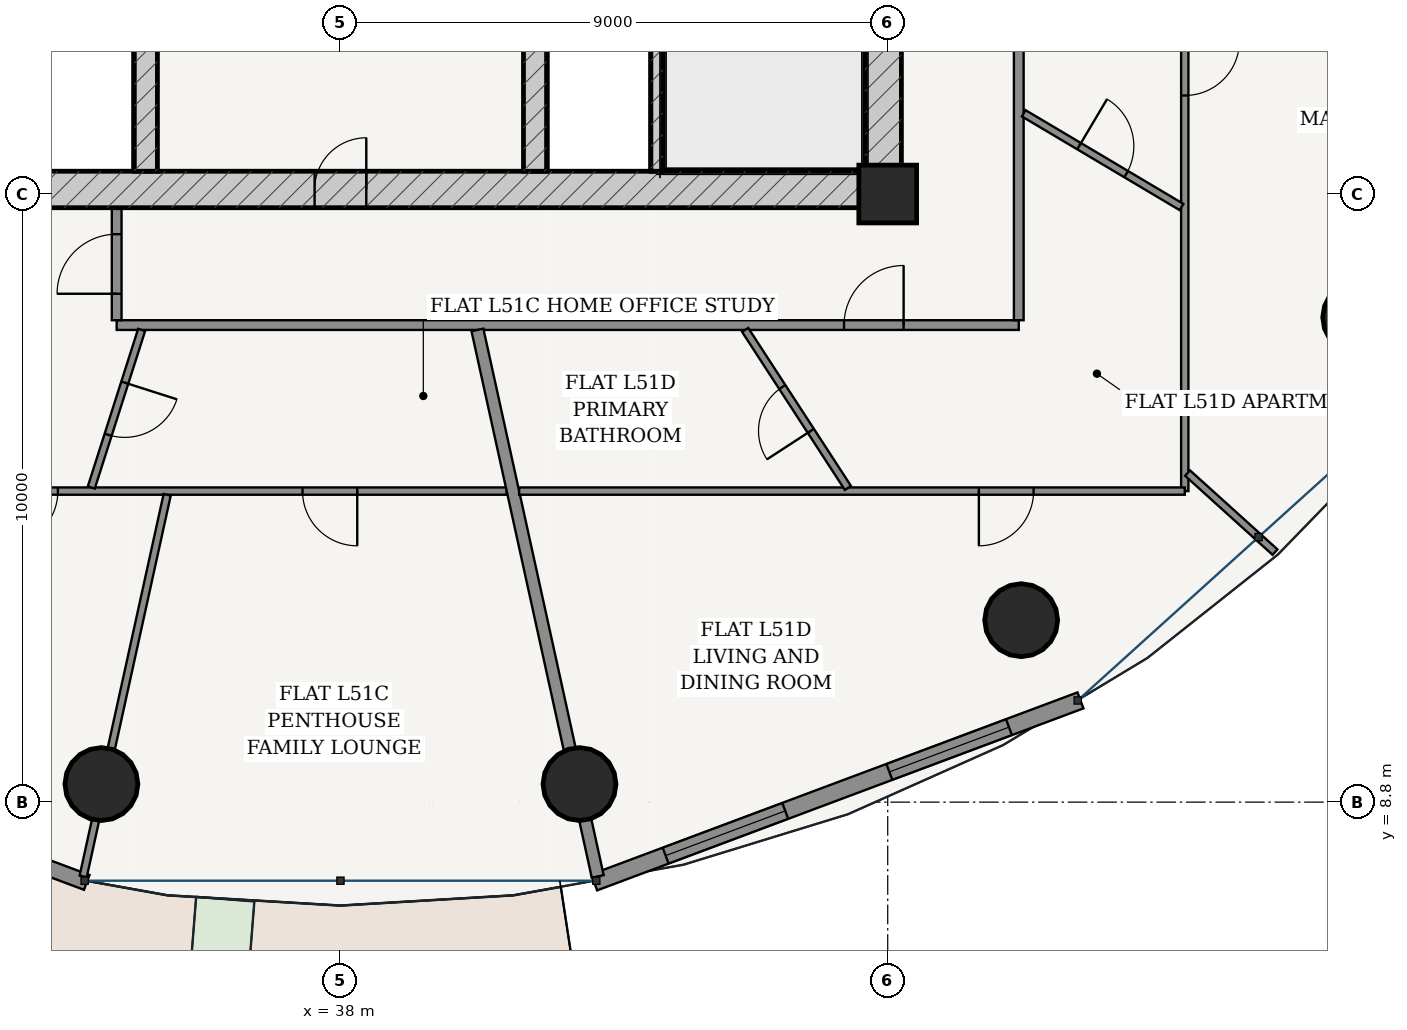
"""IFC4 building model, lengths in metres.
Left out: names, types, materials, properties, quantities, classifications, styles, units other than length and angle.
Written with IfcOpenShell. Run it as: python <this file> out.ifc"""

import sys

from ifc_helpers import new_model, si_unit, direction, frame, frame_2d, origin, origin_2d, place, context, subcontext, project, spatial, rectangle, hollow_circle, extrude, source, transform, mapped, element, fill, save


model = new_model("IFC4")
c1 = context("Model", 3, precision=1e-05, world=origin(), true_north=direction((-0.2419218956, 0.970295726276)))
c2 = subcontext(c1, "Body", "Model", "MODEL_VIEW")
j1 = project(units=[si_unit("LENGTHUNIT", "METRE"), si_unit("PLANEANGLEUNIT", "RADIAN")], contexts=[c1])
p1 = place(None, origin())
s1 = spatial("IfcSite", under=j1, at=p1, CompositionType="ELEMENT")
p2 = place(p1, origin())
s2 = spatial("IfcBuilding", under=s1, at=p2, CompositionType="ELEMENT")
p3 = place(p2, frame((0.0, 0.0, 194.9)))
s3 = spatial("IfcBuildingStorey", under=s2, at=p3, CompositionType="ELEMENT", Elevation=194.9)
p4 = place(p3, frame((47.0, 18.8, 0.0), z_axis=(0.0, 0.0, 1.0), x_axis=(1.0, 0.0, 0.0)))
e1 = element("IfcColumn", 1, at=p4, inside=s3, PredefinedType="COLUMN", context=c2, shape_type="SweptSolid", body=[
    extrude(rectangle(XDim=0.95, YDim=0.95, at=origin_2d()), origin(), (0.0, 0.0, 1.0), 3.7),
])
p5 = place(p3, frame((28.775, 18.875, 0.0), z_axis=(0.0, 0.0, 1.0), x_axis=(1.0, 0.0, 0.0)))
e2 = element("IfcWall", 2, at=p5, inside=s3, PredefinedType="SHEAR", context=c2, shape_type="SweptSolid", body=[
    extrude(rectangle(XDim=18.45, YDim=0.6, at=frame_2d((9.225, 0.0))), origin(), (0.0, 0.0, 1.0), 3.435),
])
p6 = place(p5, frame((8.8, 0.0, 0.0)))
e3 = element("IfcOpeningElement", 3, at=p6, cuts=e2, PredefinedType="OPENING", context=c2, shape_type="SweptSolid", body=[
    extrude(rectangle(XDim=0.85, YDim=2.1, at=frame_2d((0.425, 1.05))), frame((0.0, 0.31, 0.0), z_axis=(0.0, -1.0, 0.0), x_axis=(1.0, 0.0, 0.0)), (0.0, 0.0, 1.0), 0.62),
])
p7 = place(p3, frame((46.925, 19.175, 0.0), z_axis=(0.0, 0.0, 1.0), x_axis=(0.0, 1.0, 0.0)))
e4 = element("IfcWall", 4, at=p7, inside=s3, PredefinedType="SHEAR", context=c2, shape_type="SweptSolid", body=[
    extrude(rectangle(XDim=15.25, YDim=0.6, at=frame_2d((7.625, 0.0))), origin(), (0.0, 0.0, 1.0), 3.435),
])
p8 = place(p7, frame((9.875, 0.0, 0.0)))
e5 = element("IfcOpeningElement", 5, at=p8, cuts=e4, PredefinedType="OPENING", context=c2, shape_type="SweptSolid", body=[
    extrude(rectangle(XDim=1.5, YDim=2.2, at=frame_2d((0.75, 1.1))), frame((0.0, 0.31, 0.0), z_axis=(0.0, -1.0, 0.0), x_axis=(1.0, 0.0, 0.0)), (0.0, 0.0, 1.0), 0.62),
])
p9 = place(p3, frame((43.205, 19.175, 0.0), z_axis=(0.0, 0.0, 1.0), x_axis=(0.0, 1.0, 0.0)))
e6 = element("IfcWall", 6, at=p9, inside=s3, PredefinedType="SOLIDWALL", context=c2, shape_type="SweptSolid", body=[
    extrude(rectangle(XDim=7.375, YDim=0.2, at=frame_2d((3.688, 0.0))), origin(), (0.0, 0.0, 1.0), 3.435),
])
p10 = place(p3, frame((34.8, 19.175, 0.0), z_axis=(0.0, 0.0, 1.0), x_axis=(0.0, 1.0, 0.0)))
e7 = element("IfcWall", 7, at=p10, inside=s3, PredefinedType="SHEAR", context=c2, shape_type="SweptSolid", body=[
    extrude(rectangle(XDim=15.25, YDim=0.38, at=frame_2d((7.625, 0.0))), origin(), (0.0, 0.0, 1.0), 3.435),
])
p11 = place(p10, frame((7.8, 0.0, 0.0)))
e8 = element("IfcOpeningElement", 8, at=p11, cuts=e7, PredefinedType="OPENING", context=c2, shape_type="SweptSolid", body=[
    extrude(rectangle(XDim=1.05, YDim=2.15, at=frame_2d((0.525, 1.075))), frame((0.0, 0.2, 0.0), z_axis=(0.0, -1.0, 0.0), x_axis=(1.0, 0.0, 0.0)), (0.0, 0.0, 1.0), 0.4),
])
p12 = place(p3, frame((41.2, 19.175, 0.0), z_axis=(0.0, 0.0, 1.0), x_axis=(0.0, 1.0, 0.0)))
e9 = element("IfcWall", 9, at=p12, inside=s3, PredefinedType="SHEAR", context=c2, shape_type="SweptSolid", body=[
    extrude(rectangle(XDim=15.25, YDim=0.38, at=frame_2d((7.625, 0.0))), origin(), (0.0, 0.0, 1.0), 3.435),
])
p13 = place(p12, frame((7.8, 0.0, 0.0)))
e10 = element("IfcOpeningElement", 10, at=p13, cuts=e9, PredefinedType="OPENING", context=c2, shape_type="SweptSolid", body=[
    extrude(rectangle(XDim=1.05, YDim=2.15, at=frame_2d((0.525, 1.075))), frame((0.0, 0.2, 0.0), z_axis=(0.0, -1.0, 0.0), x_axis=(1.0, 0.0, 0.0)), (0.0, 0.0, 1.0), 0.4),
])
for number, where, z_axis, x_axis in (
    (11, (34.069, 9.097, 0.0), (0.0, 0.0, 1.0), (1.0, 0.0, 0.0)),
    (12, (41.931, 9.097, 0.0), (0.0, 0.0, 1.0), (1.0, 0.0, 0.0)),
    (13, (49.195, 11.792, 0.0), (0.0, 0.0, 1.0), (1.0, 0.0, 0.0)),
    (14, (54.754, 16.772, 0.0), (0.0, 0.0, 1.0), (1.0, 0.0, 0.0)),
):
    element("IfcColumn", number, at=place(p3, frame(where, z_axis=z_axis, x_axis=x_axis)), inside=s3, PredefinedType="COLUMN", context=c2, shape_type="SweptSolid", body=[
        extrude(hollow_circle(Radius=0.6, WallThickness=0.038, at=origin_2d()), origin(), (0.0, 0.0, 1.0), 3.7),
    ])
p14 = place(p3, frame((25.83, 10.473, 0.0), z_axis=(0.0, 0.0, 1.0), x_axis=(0.936556918375, -0.350515532672, 0.0)))
e15 = element("IfcWall", 15, at=p14, inside=s3, PredefinedType="SOLIDWALL", context=c2, shape_type="SweptSolid", body=[
    extrude(rectangle(XDim=8.539, YDim=0.26, at=frame_2d((4.27, 0.0))), origin(), (0.0, 0.0, 1.0), 3.435),
])
p15 = place(p14, frame((3.594, 0.0, 0.0)))
e16 = element("IfcOpeningElement", 16, at=p15, cuts=e15, PredefinedType="OPENING", context=c2, shape_type="SweptSolid", body=[
    extrude(rectangle(XDim=1.35, YDim=2.2, at=frame_2d((0.675, 1.1))), frame((0.0, 0.14, 0.0), z_axis=(0.0, -1.0, 0.0), x_axis=(1.0, 0.0, 0.0)), (0.0, 0.0, 1.0), 0.28),
])
p16 = place(p3, frame((42.172, 7.48, 0.0), z_axis=(0.0, 0.0, 1.0), x_axis=(0.936556918375, 0.350515532672, 0.0)))
e17 = element("IfcWall", 17, at=p16, inside=s3, PredefinedType="SOLIDWALL", context=c2, shape_type="SweptSolid", body=[
    extrude(rectangle(XDim=8.539, YDim=0.28, at=frame_2d((4.27, 0.0))), origin(), (0.0, 0.0, 1.0), 3.435),
])
p17 = place(p16, frame((1.256, 0.0, 0.85)))
e18 = element("IfcOpeningElement", 18, at=p17, cuts=e17, PredefinedType="OPENING", context=c2, shape_type="SweptSolid", body=[
    extrude(rectangle(XDim=2.1, YDim=1.95, at=frame_2d((1.05, 0.975))), frame((0.0, 0.15, 0.0), z_axis=(0.0, -1.0, 0.0), x_axis=(1.0, 0.0, 0.0)), (0.0, 0.0, 1.0), 0.3),
])
p18 = place(p16, frame((5.184, 0.0, 0.85)))
e19 = element("IfcOpeningElement", 19, at=p18, cuts=e17, PredefinedType="OPENING", context=c2, shape_type="SweptSolid", body=[
    extrude(rectangle(XDim=2.1, YDim=1.95, at=frame_2d((1.05, 0.975))), frame((0.0, 0.15, 0.0), z_axis=(0.0, -1.0, 0.0), x_axis=(1.0, 0.0, 0.0)), (0.0, 0.0, 1.0), 0.3),
])
p19 = place(p3, frame((34.32, 16.645, 0.0), z_axis=(0.0, 0.0, 1.0), x_axis=(1.0, 0.0, 0.0)))
e20 = element("IfcWall", 20, at=p19, inside=s3, PredefinedType="PARTITIONING", context=c2, shape_type="SweptSolid", body=[
    extrude(rectangle(XDim=14.835, YDim=0.16, at=frame_2d((7.417, 0.0))), origin(), (0.0, 0.0, 1.0), 2.951),
])
p20 = place(p19, frame((11.961, 0.0, 0.0)))
e21 = element("IfcOpeningElement", 21, at=p20, cuts=e20, PredefinedType="OPENING", context=c2, shape_type="SweptSolid", body=[
    extrude(rectangle(XDim=0.98, YDim=2.2, at=frame_2d((0.49, 1.1))), frame((0.0, 0.09, 0.0), z_axis=(0.0, -1.0, 0.0), x_axis=(1.0, 0.0, 0.0)), (0.0, 0.0, 1.0), 0.18),
])
p21 = place(p3, frame((34.32, 16.725, 0.0), z_axis=(0.0, 0.0, 1.0), x_axis=(0.0, 1.0, 0.0)))
e22 = element("IfcWall", 22, at=p21, inside=s3, PredefinedType="PARTITIONING", context=c2, shape_type="SweptSolid", body=[
    extrude(rectangle(XDim=1.85, YDim=0.16, at=frame_2d((0.925, 0.0))), origin(), (0.0, 0.0, 1.0), 3.435),
])
p22 = place(p21, frame((0.435, 0.0, 0.0)))
e23 = element("IfcOpeningElement", 23, at=p22, cuts=e22, PredefinedType="OPENING", context=c2, shape_type="SweptSolid", body=[
    extrude(rectangle(XDim=0.98, YDim=2.2, at=frame_2d((0.49, 1.1))), frame((0.0, 0.09, 0.0), z_axis=(0.0, -1.0, 0.0), x_axis=(1.0, 0.0, 0.0)), (0.0, 0.0, 1.0), 0.18),
])
p23 = place(p3, frame((49.155, 16.725, 0.0), z_axis=(0.0, 0.0, 1.0), x_axis=(0.0, 1.0, 0.0)))
e24 = element("IfcWall", 24, at=p23, inside=s3, PredefinedType="PARTITIONING", context=c2, shape_type="SweptSolid", body=[
    extrude(rectangle(XDim=18.3, YDim=0.16, at=frame_2d((9.15, 0.0))), origin(), (0.0, 0.0, 1.0), 2.951),
])
p24 = place(p3, frame((40.734, 13.915, 0.0), z_axis=(0.0, 0.0, 1.0), x_axis=(-1.0, 0.0, 0.0)))
e25 = element("IfcWall", 25, at=p24, inside=s3, PredefinedType="PARTITIONING", context=c2, shape_type="SweptSolid", body=[
    extrude(rectangle(XDim=9.144, YDim=0.12, at=frame_2d((4.572, 0.0))), origin(), (0.0, 0.0, 1.0), 2.951),
])
p25 = place(p24, frame((7.381, 0.0, 0.0)))
e26 = element("IfcOpeningElement", 26, at=p25, cuts=e25, PredefinedType="OPENING", context=c2, shape_type="SweptSolid", body=[
    extrude(rectangle(XDim=0.9, YDim=2.15, at=frame_2d((0.45, 1.075))), frame((0.0, 0.07, 0.0), z_axis=(0.0, -1.0, 0.0), x_axis=(1.0, 0.0, 0.0)), (0.0, 0.0, 1.0), 0.14),
])
p26 = place(p24, frame((2.458, 0.0, 0.0)))
e27 = element("IfcOpeningElement", 27, at=p26, cuts=e25, PredefinedType="OPENING", context=c2, shape_type="SweptSolid", body=[
    extrude(rectangle(XDim=0.9, YDim=2.15, at=frame_2d((0.45, 1.075))), frame((0.0, 0.07, 0.0), z_axis=(0.0, -1.0, 0.0), x_axis=(1.0, 0.0, 0.0)), (0.0, 0.0, 1.0), 0.14),
])
p27 = place(p3, frame((35.15, 13.854, 0.0), z_axis=(0.0, 0.0, 1.0), x_axis=(-0.214942949264, -0.976626606519, 0.0)))
e28 = element("IfcWall", 28, at=p27, inside=s3, PredefinedType="PARTITIONING", context=c2, shape_type="SweptSolid", body=[
    extrude(rectangle(XDim=6.427, YDim=0.12, at=frame_2d((3.213, 0.0))), origin(), (0.0, 0.0, 1.0), 2.951),
])
p28 = place(p3, frame((34.73, 16.565, 0.0), z_axis=(0.0, 0.0, 1.0), x_axis=(-0.304300161081, -0.952576197459, 0.0)))
e29 = element("IfcWall", 29, at=p28, inside=s3, PredefinedType="PARTITIONING", context=c2, shape_type="SweptSolid", body=[
    extrude(rectangle(XDim=2.72, YDim=0.12, at=frame_2d((1.36, 0.0))), origin(), (0.0, 0.0, 1.0), 3.11),
])
p29 = place(p28, frame((0.91, 0.0, 0.0)))
e30 = element("IfcOpeningElement", 30, at=p29, cuts=e29, PredefinedType="OPENING", context=c2, shape_type="SweptSolid", body=[
    extrude(rectangle(XDim=0.9, YDim=2.15, at=frame_2d((0.45, 1.075))), frame((0.0, 0.07, 0.0), z_axis=(0.0, -1.0, 0.0), x_axis=(1.0, 0.0, 0.0)), (0.0, 0.0, 1.0), 0.14),
])
p30 = place(p3, frame((40.253, 16.565, 0.0), z_axis=(0.0, 0.0, 1.0), x_axis=(0.214957946814, -0.976623305631, 0.0)))
e31 = element("IfcWall", 31, at=p30, inside=s3, PredefinedType="PARTITIONING", context=c2, shape_type="SweptSolid", body=[
    extrude(rectangle(XDim=9.202, YDim=0.2, at=frame_2d((4.601, 0.0))), origin(), (0.0, 0.0, 1.0), 2.951),
])
p31 = place(p3, frame((51.885, 29.194, 0.0), z_axis=(0.0, 0.0, 1.0), x_axis=(0.0, -1.0, 0.0)))
e32 = element("IfcWall", 32, at=p31, inside=s3, PredefinedType="PARTITIONING", context=c2, shape_type="SweptSolid", body=[
    extrude(rectangle(XDim=15.279, YDim=0.12, at=frame_2d((7.639, 0.0))), origin(), (0.0, 0.0, 1.0), 2.951),
])
p32 = place(p31, frame((7.873, 0.0, 0.0)))
e33 = element("IfcOpeningElement", 33, at=p32, cuts=e32, PredefinedType="OPENING", context=c2, shape_type="SweptSolid", body=[
    extrude(rectangle(XDim=0.9, YDim=2.15, at=frame_2d((0.45, 1.075))), frame((0.0, 0.07, 0.0), z_axis=(0.0, -1.0, 0.0), x_axis=(1.0, 0.0, 0.0)), (0.0, 0.0, 1.0), 0.14),
])
p33 = place(p3, frame((51.885, 13.915, 0.0), z_axis=(0.0, 0.0, 1.0), x_axis=(-1.0, 0.0, 0.0)))
e34 = element("IfcWall", 34, at=p33, inside=s3, PredefinedType="PARTITIONING", context=c2, shape_type="SweptSolid", body=[
    extrude(rectangle(XDim=10.947, YDim=0.12, at=frame_2d((5.473, 0.0))), origin(), (0.0, 0.0, 1.0), 2.951),
])
p34 = place(p33, frame((2.486, 0.0, 0.0)))
e35 = element("IfcOpeningElement", 35, at=p34, cuts=e34, PredefinedType="OPENING", context=c2, shape_type="SweptSolid", body=[
    extrude(rectangle(XDim=0.9, YDim=2.15, at=frame_2d((0.45, 1.075))), frame((0.0, 0.07, 0.0), z_axis=(0.0, -1.0, 0.0), x_axis=(1.0, 0.0, 0.0)), (0.0, 0.0, 1.0), 0.14),
])
p35 = place(p3, frame((51.931, 14.211, 0.0), z_axis=(0.0, 0.0, 1.0), x_axis=(0.741971265209, -0.670431683026, 0.0)))
e36 = element("IfcWall", 36, at=p35, inside=s3, PredefinedType="PARTITIONING", context=c2, shape_type="SweptSolid", body=[
    extrude(rectangle(XDim=1.938, YDim=0.12, at=frame_2d((0.969, 0.0))), origin(), (0.0, 0.0, 1.0), 2.951),
])
p36 = place(p3, frame((44.656, 16.565, 0.0), z_axis=(0.0, 0.0, 1.0), x_axis=(0.545173870382, -0.838322999239, 0.0)))
e37 = element("IfcWall", 37, at=p36, inside=s3, PredefinedType="PARTITIONING", context=c2, shape_type="SweptSolid", body=[
    extrude(rectangle(XDim=3.099, YDim=0.12, at=frame_2d((1.549, 0.0))), origin(), (0.0, 0.0, 1.0), 3.11),
])
p37 = place(p36, frame((1.119, 0.0, 0.0)))
e38 = element("IfcOpeningElement", 38, at=p37, cuts=e37, PredefinedType="OPENING", context=c2, shape_type="SweptSolid", body=[
    extrude(rectangle(XDim=0.86, YDim=2.15, at=frame_2d((0.43, 1.075))), frame((0.0, 0.07, 0.0), z_axis=(0.0, -1.0, 0.0), x_axis=(1.0, 0.0, 0.0)), (0.0, 0.0, 1.0), 0.14),
])
p38 = place(p3, frame((49.237, 20.128, 0.0), z_axis=(0.0, 0.0, 1.0), x_axis=(0.859818120481, -0.510600430565, 0.0)))
e39 = element("IfcWall", 39, at=p38, inside=s3, PredefinedType="PARTITIONING", context=c2, shape_type="SweptSolid", body=[
    extrude(rectangle(XDim=3.018, YDim=0.12, at=frame_2d((1.509, 0.0))), origin(), (0.0, 0.0, 1.0), 2.951),
])
p39 = place(p38, frame((1.059, 0.0, 0.0)))
e40 = element("IfcOpeningElement", 40, at=p39, cuts=e39, PredefinedType="OPENING", context=c2, shape_type="SweptSolid", body=[
    extrude(rectangle(XDim=0.9, YDim=2.15, at=frame_2d((0.45, 1.075))), frame((0.0, 0.07, 0.0), z_axis=(0.0, -1.0, 0.0), x_axis=(1.0, 0.0, 0.0)), (0.0, 0.0, 1.0), 0.14),
])
m1 = source(origin(), c2, "Body", "SweptSolid", [
    extrude(rectangle(XDim=2.1, YDim=1.95, at=frame_2d((1.05, 0.975))), frame((0.0, 0.03, 0.0), z_axis=(0.0, -1.0, 0.0), x_axis=(1.0, 0.0, 0.0)), (0.0, 0.0, 1.0), 0.06),
])
p40 = place(p17, origin())
e41 = element("IfcWindow", 41, at=p40, inside=s3, PartitioningType="SINGLE_PANEL", PredefinedType="WINDOW", context=c2, shape_type="MappedRepresentation", body=[
    mapped(m1, transform((0.0, 0.0, 0.0), scale=1.0)),
])
fill(e18, e41)
p41 = place(p18, origin())
e42 = element("IfcWindow", 42, at=p41, inside=s3, PartitioningType="SINGLE_PANEL", PredefinedType="WINDOW", context=c2, shape_type="MappedRepresentation", body=[
    mapped(m1, transform((0.0, 0.0, 0.0), scale=1.0)),
])
fill(e19, e42)
m2 = source(origin(), c2, "Body", "SweptSolid", [
    extrude(rectangle(XDim=0.85, YDim=2.1, at=frame_2d((0.425, 1.05))), frame((0.0, 0.025, 0.0), z_axis=(0.0, -1.0, 0.0), x_axis=(1.0, 0.0, 0.0)), (0.0, 0.0, 1.0), 0.05),
])
p42 = place(p6, origin())
e43 = element("IfcDoor", 43, at=p42, inside=s3, OperationType="SINGLE_SWING_RIGHT", PredefinedType="DOOR", context=c2, shape_type="MappedRepresentation", body=[
    mapped(m2, transform((0.0, 0.0, 0.0), scale=1.0)),
])
fill(e3, e43)
m3 = source(origin(), c2, "Body", "SweptSolid", [
    extrude(rectangle(XDim=0.98, YDim=2.2, at=frame_2d((0.49, 1.1))), frame((0.0, 0.025, 0.0), z_axis=(0.0, -1.0, 0.0), x_axis=(1.0, 0.0, 0.0)), (0.0, 0.0, 1.0), 0.05),
])
p43 = place(p22, origin())
e44 = element("IfcDoor", 44, at=p43, inside=s3, OperationType="SINGLE_SWING_LEFT", PredefinedType="DOOR", context=c2, shape_type="MappedRepresentation", body=[
    mapped(m3, transform((0.0, 0.0, 0.0), scale=1.0)),
])
fill(e23, e44)
m4 = source(origin(), c2, "Body", "SweptSolid", [
    extrude(rectangle(XDim=0.9, YDim=2.15, at=frame_2d((0.45, 1.075))), frame((0.0, 0.025, 0.0), z_axis=(0.0, -1.0, 0.0), x_axis=(1.0, 0.0, 0.0)), (0.0, 0.0, 1.0), 0.05),
])
p44 = place(p29, origin())
e45 = element("IfcDoor", 45, at=p44, inside=s3, OperationType="SINGLE_SWING_LEFT", PredefinedType="DOOR", context=c2, shape_type="MappedRepresentation", body=[
    mapped(m4, transform((0.0, 0.0, 0.0), scale=1.0)),
])
fill(e30, e45)
p45 = place(p25, origin())
e46 = element("IfcDoor", 46, at=p45, inside=s3, OperationType="SINGLE_SWING_RIGHT", PredefinedType="DOOR", context=c2, shape_type="MappedRepresentation", body=[
    mapped(m4, transform((0.0, 0.0, 0.0), scale=1.0)),
])
fill(e26, e46)
p46 = place(p26, origin())
e47 = element("IfcDoor", 47, at=p46, inside=s3, OperationType="SINGLE_SWING_LEFT", PredefinedType="DOOR", context=c2, shape_type="MappedRepresentation", body=[
    mapped(m4, transform((0.0, 0.0, 0.0), scale=1.0)),
])
fill(e27, e47)
p47 = place(p20, origin())
e48 = element("IfcDoor", 48, at=p47, inside=s3, OperationType="SINGLE_SWING_RIGHT", PredefinedType="DOOR", context=c2, shape_type="MappedRepresentation", body=[
    mapped(m3, transform((0.0, 0.0, 0.0), scale=1.0)),
])
fill(e21, e48)
m5 = source(origin(), c2, "Body", "SweptSolid", [
    extrude(rectangle(XDim=0.86, YDim=2.15, at=frame_2d((0.43, 1.075))), frame((0.0, 0.025, 0.0), z_axis=(0.0, -1.0, 0.0), x_axis=(1.0, 0.0, 0.0)), (0.0, 0.0, 1.0), 0.05),
])
p48 = place(p37, frame((0.86, 0.0, 0.0), z_axis=(0.0, 0.0, 1.0), x_axis=(-1.0, 0.0, 0.0)))
e49 = element("IfcDoor", 49, at=p48, inside=s3, OperationType="SINGLE_SWING_LEFT", PredefinedType="DOOR", context=c2, shape_type="MappedRepresentation", body=[
    mapped(m5, transform((0.0, 0.0, 0.0), scale=1.0)),
])
fill(e38, e49)
p49 = place(p34, origin())
e50 = element("IfcDoor", 50, at=p49, inside=s3, OperationType="SINGLE_SWING_RIGHT", PredefinedType="DOOR", context=c2, shape_type="MappedRepresentation", body=[
    mapped(m4, transform((0.0, 0.0, 0.0), scale=1.0)),
])
fill(e35, e50)
p50 = place(p39, origin())
e51 = element("IfcDoor", 51, at=p50, inside=s3, OperationType="SINGLE_SWING_LEFT", PredefinedType="DOOR", context=c2, shape_type="MappedRepresentation", body=[
    mapped(m4, transform((0.0, 0.0, 0.0), scale=1.0)),
])
fill(e40, e51)
p51 = place(p32, origin())
e52 = element("IfcDoor", 52, at=p51, inside=s3, OperationType="SINGLE_SWING_LEFT", PredefinedType="DOOR", context=c2, shape_type="MappedRepresentation", body=[
    mapped(m4, transform((0.0, 0.0, 0.0), scale=1.0)),
])
fill(e33, e52)
save(model, sys.argv[1])
